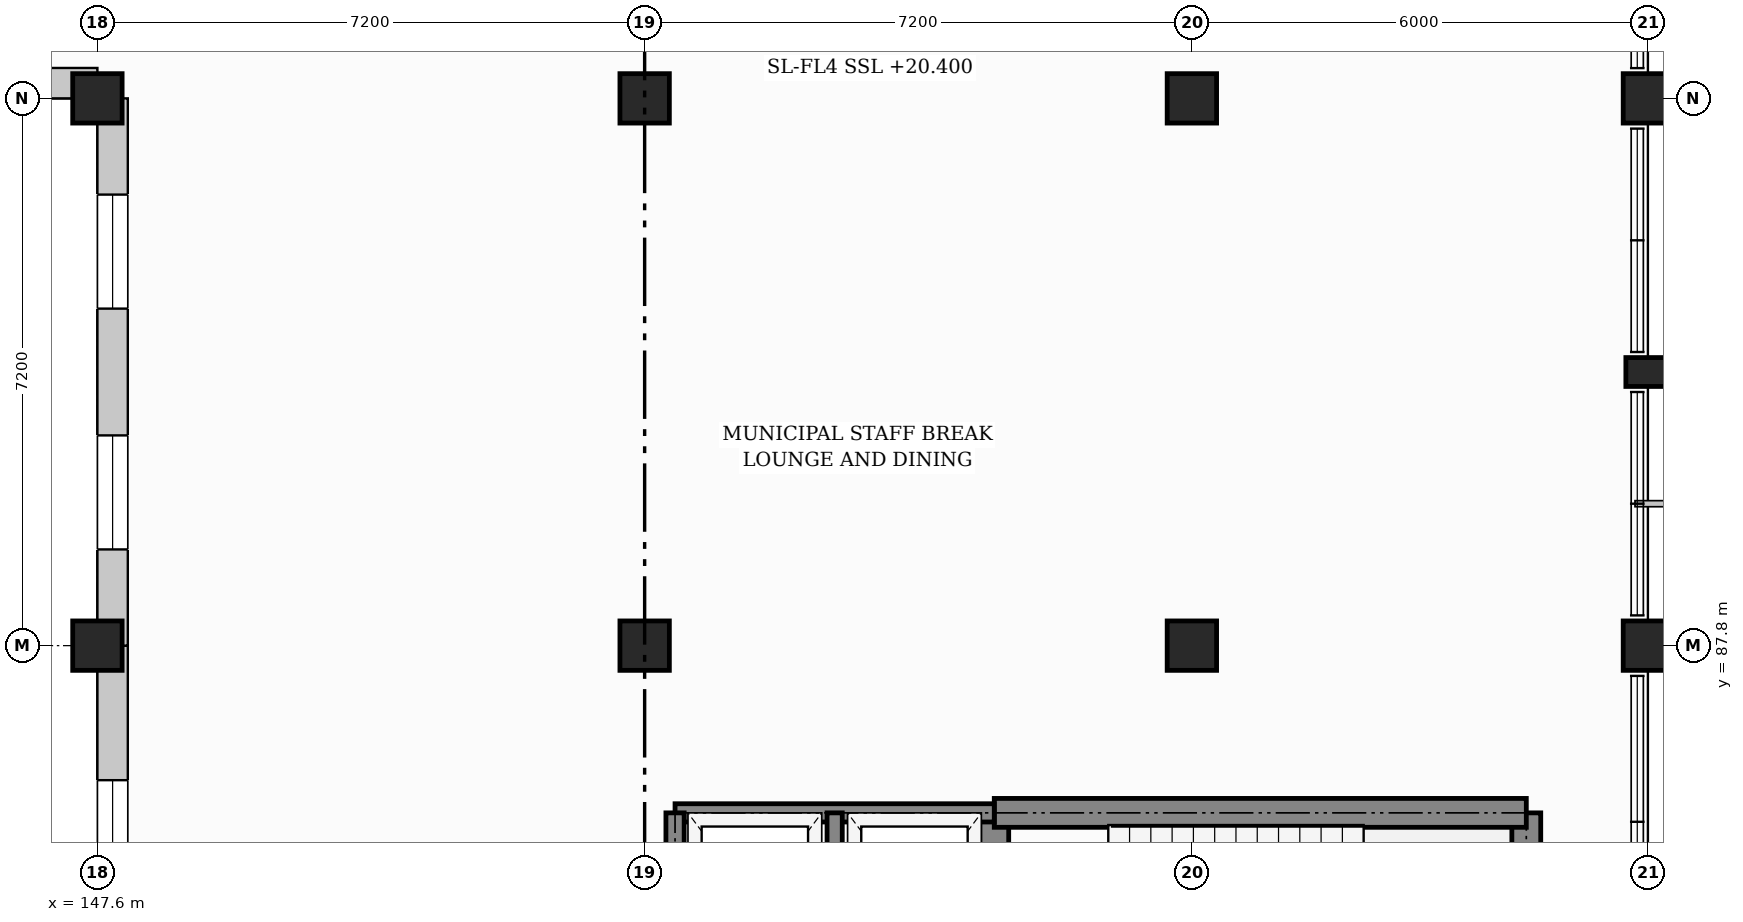
"""IFC4 building model, lengths in metres.
Left out: names, types, materials, properties, quantities, classifications, styles, units other than length and angle.
Written with IfcOpenShell. Run it as: python <this file> out.ifc"""

import sys

from ifc_helpers import new_model, si_unit, direction, frame, frame_2d, origin, origin_2d, place, context, subcontext, project, spatial, rectangle, extrude, element, fill, save


model = new_model("IFC4")
c1 = context("Model", 3, precision=1e-05, world=origin(), true_north=direction((0.0, 1.0)))
c2 = subcontext(c1, "Body", "Model", "MODEL_VIEW")
j1 = project(units=[si_unit("LENGTHUNIT", "METRE"), si_unit("PLANEANGLEUNIT", "RADIAN")], contexts=[c1])
p1 = place(None, origin())
s1 = spatial("IfcSite", under=j1, at=p1, CompositionType="ELEMENT")
p2 = place(p1, origin())
s2 = spatial("IfcBuilding", under=s1, at=p2, CompositionType="ELEMENT")
p3 = place(p2, frame((0.0, 0.0, 20.4)))
s3 = spatial("IfcBuildingStorey", under=s2, at=p3, CompositionType="ELEMENT", Elevation=20.4)
for number, where, z_axis, x_axis in (
    (1, (147.6, 87.8, 0.0), (0.0, 0.0, 1.0), (1.0, 0.0, 0.0)),
    (2, (147.6, 95.0, 0.0), (0.0, 0.0, 1.0), (1.0, 0.0, 0.0)),
    (3, (154.8, 87.8, 0.0), (0.0, 0.0, 1.0), (1.0, 0.0, 0.0)),
    (4, (154.8, 95.0, 0.0), (0.0, 0.0, 1.0), (1.0, 0.0, 0.0)),
    (5, (162.0, 87.8, 0.0), (0.0, 0.0, 1.0), (1.0, 0.0, 0.0)),
    (6, (162.0, 95.0, 0.0), (0.0, 0.0, 1.0), (1.0, 0.0, 0.0)),
    (7, (168.0, 87.8, 0.0), (0.0, 0.0, 1.0), (1.0, 0.0, 0.0)),
    (8, (168.0, 95.0, 0.0), (0.0, 0.0, 1.0), (1.0, 0.0, 0.0)),
):
    element("IfcColumn", number, at=place(p3, frame(where, z_axis=z_axis, x_axis=x_axis)), inside=s3, PredefinedType="COLUMN", context=c2, shape_type="SweptSolid", body=[
        extrude(rectangle(XDim=0.65, YDim=0.65, at=origin_2d()), origin(), (0.0, 0.0, 1.0), 3.6),
    ])
p4 = place(p3, frame((168.0, 91.4, 0.0), z_axis=(0.0, 0.0, 1.0), x_axis=(1.0, 0.0, 0.0)))
e9 = element("IfcColumn", 9, at=p4, inside=s3, PredefinedType="PILASTER", context=c2, shape_type="SweptSolid", body=[
    extrude(rectangle(XDim=0.58, YDim=0.38, at=origin_2d()), origin(), (0.0, 0.0, 1.0), 3.6),
])
p5 = place(p3, frame((147.8, 78.8, 0.0), z_axis=(0.0, 0.0, 1.0), x_axis=(0.0, 1.0, 0.0)))
e10 = element("IfcWall", 10, at=p5, inside=s3, PredefinedType="SOLIDWALL", context=c2, shape_type="SweptSolid", body=[
    extrude(rectangle(XDim=9.0, YDim=0.4, at=frame_2d((4.5, 0.0))), origin(), (0.0, 0.0, 1.0), 2.54),
])
p6 = place(p5, frame((1.77, 0.0, 0.75)))
e11 = element("IfcOpeningElement", 11, at=p6, cuts=e10, PredefinedType="OPENING", context=c2, shape_type="SweptSolid", body=[
    extrude(rectangle(XDim=1.5, YDim=1.6, at=frame_2d((0.75, 0.8))), frame((0.0, 0.21, 0.0), z_axis=(0.0, -1.0, 0.0), x_axis=(1.0, 0.0, 0.0)), (0.0, 0.0, 1.0), 0.42),
])
p7 = place(p5, frame((5.73, 0.0, 0.75)))
e12 = element("IfcOpeningElement", 12, at=p7, cuts=e10, PredefinedType="OPENING", context=c2, shape_type="SweptSolid", body=[
    extrude(rectangle(XDim=1.5, YDim=1.6, at=frame_2d((0.75, 0.8))), frame((0.0, 0.21, 0.0), z_axis=(0.0, -1.0, 0.0), x_axis=(1.0, 0.0, 0.0)), (0.0, 0.0, 1.0), 0.42),
])
p8 = place(p3, frame((147.8, 87.8, 0.0), z_axis=(0.0, 0.0, 1.0), x_axis=(0.0, 1.0, 0.0)))
e13 = element("IfcWall", 13, at=p8, inside=s3, PredefinedType="SOLIDWALL", context=c2, shape_type="SweptSolid", body=[
    extrude(rectangle(XDim=7.2, YDim=0.4, at=frame_2d((3.6, 0.0))), origin(), (0.0, 0.0, 1.0), 2.54),
])
p9 = place(p8, frame((1.266, 0.0, 0.75)))
e14 = element("IfcOpeningElement", 14, at=p9, cuts=e13, PredefinedType="OPENING", context=c2, shape_type="SweptSolid", body=[
    extrude(rectangle(XDim=1.5, YDim=1.6, at=frame_2d((0.75, 0.8))), frame((0.0, 0.21, 0.0), z_axis=(0.0, -1.0, 0.0), x_axis=(1.0, 0.0, 0.0)), (0.0, 0.0, 1.0), 0.42),
])
p10 = place(p8, frame((4.434, 0.0, 0.75)))
e15 = element("IfcOpeningElement", 15, at=p10, cuts=e13, PredefinedType="OPENING", context=c2, shape_type="SweptSolid", body=[
    extrude(rectangle(XDim=1.5, YDim=1.6, at=frame_2d((0.75, 0.8))), frame((0.0, 0.21, 0.0), z_axis=(0.0, -1.0, 0.0), x_axis=(1.0, 0.0, 0.0)), (0.0, 0.0, 1.0), 0.42),
])
p11 = place(p3, frame((147.6, 95.2, 0.0), z_axis=(0.0, 0.0, 1.0), x_axis=(-1.0, 0.0, 0.0)))
e16 = element("IfcWall", 16, at=p11, inside=s3, PredefinedType="SOLIDWALL", context=c2, shape_type="SweptSolid", body=[
    extrude(rectangle(XDim=9.0, YDim=0.4, at=frame_2d((4.5, 0.0))), origin(), (0.0, 0.0, 1.0), 2.59),
])
p12 = place(p11, frame((1.77, 0.0, 0.75)))
e17 = element("IfcOpeningElement", 17, at=p12, cuts=e16, PredefinedType="OPENING", context=c2, shape_type="SweptSolid", body=[
    extrude(rectangle(XDim=1.5, YDim=1.6, at=frame_2d((0.75, 0.8))), frame((0.0, 0.21, 0.0), z_axis=(0.0, -1.0, 0.0), x_axis=(1.0, 0.0, 0.0)), (0.0, 0.0, 1.0), 0.42),
])
p13 = place(p11, frame((5.73, 0.0, 0.75)))
e18 = element("IfcOpeningElement", 18, at=p13, cuts=e16, PredefinedType="OPENING", context=c2, shape_type="SweptSolid", body=[
    extrude(rectangle(XDim=1.5, YDim=1.6, at=frame_2d((0.75, 0.8))), frame((0.0, 0.21, 0.0), z_axis=(0.0, -1.0, 0.0), x_axis=(1.0, 0.0, 0.0)), (0.0, 0.0, 1.0), 0.42),
])
p14 = place(p3, frame((159.4, 79.6, 0.0), z_axis=(0.0, 0.0, 1.0), x_axis=(0.0, 1.0, 0.0)))
e19 = element("IfcWall", 19, at=p14, inside=s3, PredefinedType="SHEAR", context=c2, shape_type="SweptSolid", body=[
    extrude(rectangle(XDim=6.0, YDim=0.38, at=frame_2d((3.0, 0.0))), origin(), (0.0, 0.0, 1.0), 3.34),
])
p15 = place(p14, frame((1.275, 0.0, 0.0)))
e20 = element("IfcOpeningElement", 20, at=p15, cuts=e19, PredefinedType="OPENING", context=c2, shape_type="SweptSolid", body=[
    extrude(rectangle(XDim=1.05, YDim=2.15, at=frame_2d((0.525, 1.075))), frame((0.0, 0.2, 0.0), z_axis=(0.0, -1.0, 0.0), x_axis=(1.0, 0.0, 0.0)), (0.0, 0.0, 1.0), 0.4),
])
p16 = place(p3, frame((166.4, 79.6, 0.0), z_axis=(0.0, 0.0, 1.0), x_axis=(0.0, 1.0, 0.0)))
e21 = element("IfcWall", 21, at=p16, inside=s3, PredefinedType="SHEAR", context=c2, shape_type="SweptSolid", body=[
    extrude(rectangle(XDim=6.0, YDim=0.38, at=frame_2d((3.0, 0.0))), origin(), (0.0, 0.0, 1.0), 3.34),
])
p17 = place(p3, frame((159.4, 85.6, 0.0), z_axis=(0.0, 0.0, 1.0), x_axis=(1.0, 0.0, 0.0)))
e22 = element("IfcWall", 22, at=p17, inside=s3, PredefinedType="SHEAR", context=c2, shape_type="SweptSolid", body=[
    extrude(rectangle(XDim=7.0, YDim=0.38, at=frame_2d((3.5, 0.0))), origin(), (0.0, 0.0, 1.0), 3.34),
])
p18 = place(p3, frame((155.2, 85.6, 0.0), z_axis=(0.0, 0.0, 1.0), x_axis=(1.0, 0.0, 0.0)))
e23 = element("IfcWall", 23, at=p18, inside=s3, PredefinedType="SHEAR", context=c2, shape_type="SweptSolid", body=[
    extrude(rectangle(XDim=4.2, YDim=0.24, at=frame_2d((2.1, 0.0))), origin(), (0.0, 0.0, 1.0), 3.34),
])
p19 = place(p3, frame((155.2, 83.25, 0.0), z_axis=(0.0, 0.0, 1.0), x_axis=(0.0, 1.0, 0.0)))
e24 = element("IfcWall", 24, at=p19, inside=s3, PredefinedType="SHEAR", context=c2, shape_type="SweptSolid", body=[
    extrude(rectangle(XDim=2.35, YDim=0.24, at=frame_2d((1.175, 0.0))), origin(), (0.0, 0.0, 1.0), 3.34),
])
p20 = place(p3, frame((157.3, 83.25, 0.0), z_axis=(0.0, 0.0, 1.0), x_axis=(0.0, 1.0, 0.0)))
e25 = element("IfcWall", 25, at=p20, inside=s3, PredefinedType="SHEAR", context=c2, shape_type="SweptSolid", body=[
    extrude(rectangle(XDim=2.35, YDim=0.2, at=frame_2d((1.175, 0.0))), origin(), (0.0, 0.0, 1.0), 3.34),
])
p21 = place(p7, origin())
e26 = element("IfcWindow", 26, at=p21, inside=s3, PartitioningType="DOUBLE_PANEL_HORIZONTAL", PredefinedType="WINDOW", context=c2, shape_type="SweptSolid", body=[
    extrude(rectangle(XDim=1.5, YDim=1.6, at=frame_2d((0.75, 0.8))), frame((0.0, 0.03, 0.0), z_axis=(0.0, -1.0, 0.0), x_axis=(1.0, 0.0, 0.0)), (0.0, 0.0, 1.0), 0.06),
])
fill(e12, e26)
p22 = place(p9, origin())
e27 = element("IfcWindow", 27, at=p22, inside=s3, PartitioningType="DOUBLE_PANEL_HORIZONTAL", PredefinedType="WINDOW", context=c2, shape_type="SweptSolid", body=[
    extrude(rectangle(XDim=1.5, YDim=1.6, at=frame_2d((0.75, 0.8))), frame((0.0, 0.03, 0.0), z_axis=(0.0, -1.0, 0.0), x_axis=(1.0, 0.0, 0.0)), (0.0, 0.0, 1.0), 0.06),
])
fill(e14, e27)
p23 = place(p10, origin())
e28 = element("IfcWindow", 28, at=p23, inside=s3, PartitioningType="DOUBLE_PANEL_HORIZONTAL", PredefinedType="WINDOW", context=c2, shape_type="SweptSolid", body=[
    extrude(rectangle(XDim=1.5, YDim=1.6, at=frame_2d((0.75, 0.8))), frame((0.0, 0.03, 0.0), z_axis=(0.0, -1.0, 0.0), x_axis=(1.0, 0.0, 0.0)), (0.0, 0.0, 1.0), 0.06),
])
fill(e15, e28)
save(model, sys.argv[1])
